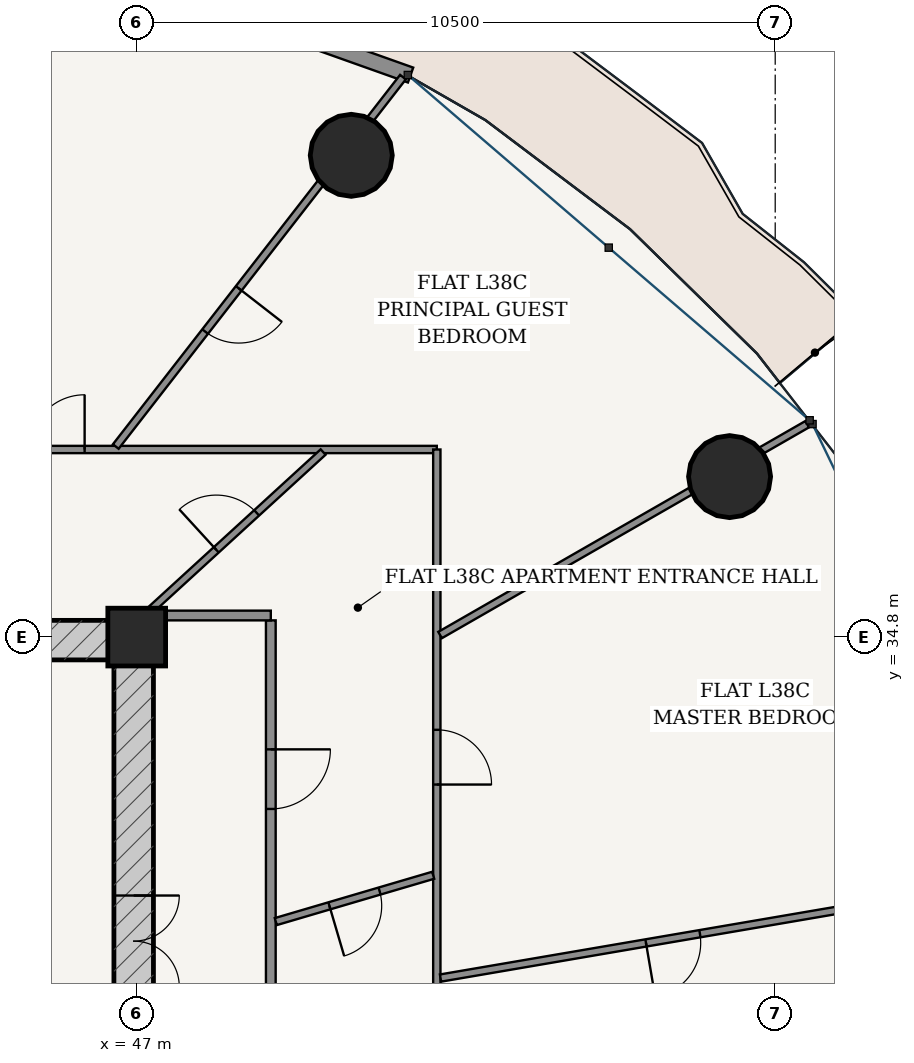
"""IFC4 building model, lengths in metres.
Left out: names, types, materials, properties, quantities, classifications, styles, units other than length and angle.
Written with IfcOpenShell. Run it as: python <this file> out.ifc"""

import sys

from ifc_helpers import new_model, si_unit, direction, frame, frame_2d, origin, origin_2d, place, context, subcontext, project, spatial, rectangle, hollow_circle, extrude, source, transform, mapped, element, fill, save


model = new_model("IFC4")
c1 = context("Model", 3, precision=1e-05, world=origin(), true_north=direction((-0.2419218956, 0.970295726276)))
c2 = subcontext(c1, "Body", "Model", "MODEL_VIEW")
j1 = project(units=[si_unit("LENGTHUNIT", "METRE"), si_unit("PLANEANGLEUNIT", "RADIAN")], contexts=[c1])
p1 = place(None, origin())
s1 = spatial("IfcSite", under=j1, at=p1, CompositionType="ELEMENT")
p2 = place(p1, origin())
s2 = spatial("IfcBuilding", under=s1, at=p2, CompositionType="ELEMENT")
p3 = place(p2, frame((0.0, 0.0, 146.2)))
s3 = spatial("IfcBuildingStorey", under=s2, at=p3, CompositionType="ELEMENT", Elevation=146.2)
p4 = place(p3, frame((47.0, 34.8, 0.0), z_axis=(0.0, 0.0, 1.0), x_axis=(1.0, 0.0, 0.0)))
e1 = element("IfcColumn", 1, at=p4, inside=s3, PredefinedType="COLUMN", context=c2, shape_type="SweptSolid", body=[
    extrude(rectangle(XDim=0.95, YDim=0.95, at=origin_2d()), origin(), (0.0, 0.0, 1.0), 3.6),
])
p5 = place(p3, frame((28.725, 34.75, 0.0), z_axis=(0.0, 0.0, 1.0), x_axis=(1.0, 0.0, 0.0)))
e2 = element("IfcWall", 2, at=p5, inside=s3, PredefinedType="SHEAR", context=c2, shape_type="SweptSolid", body=[
    extrude(rectangle(XDim=18.55, YDim=0.65, at=frame_2d((9.275, 0.0))), origin(), (0.0, 0.0, 1.0), 3.33),
])
p6 = place(p3, frame((46.95, 19.175, 0.0), z_axis=(0.0, 0.0, 1.0), x_axis=(0.0, 1.0, 0.0)))
e3 = element("IfcWall", 3, at=p6, inside=s3, PredefinedType="SHEAR", context=c2, shape_type="SweptSolid", body=[
    extrude(rectangle(XDim=15.25, YDim=0.65, at=frame_2d((7.625, 0.0))), origin(), (0.0, 0.0, 1.0), 3.33),
])
p7 = place(p6, frame((9.875, 0.0, 0.0)))
e4 = element("IfcOpeningElement", 4, at=p7, cuts=e3, PredefinedType="OPENING", context=c2, shape_type="SweptSolid", body=[
    extrude(rectangle(XDim=1.5, YDim=2.2, at=frame_2d((0.75, 1.1))), frame((0.0, 0.335, 0.0), z_axis=(0.0, -1.0, 0.0), x_axis=(1.0, 0.0, 0.0)), (0.0, 0.0, 1.0), 0.67),
])
for number, where, z_axis, x_axis in (
    (5, (56.75, 37.439, 0.0), (0.0, 0.0, 1.0), (1.0, 0.0, 0.0)),
    (6, (50.528, 42.723, 0.0), (0.0, 0.0, 1.0), (1.0, 0.0, 0.0)),
):
    element("IfcColumn", number, at=place(p3, frame(where, z_axis=z_axis, x_axis=x_axis)), inside=s3, PredefinedType="COLUMN", context=c2, shape_type="SweptSolid", body=[
        extrude(hollow_circle(Radius=0.675, WallThickness=0.042, at=origin_2d()), origin(), (0.0, 0.0, 1.0), 3.6),
    ])
p8 = place(p3, frame((51.503, 44.043, 0.0), z_axis=(0.0, 0.0, 1.0), x_axis=(-0.942095406405, 0.335344964522, 0.0)))
e7 = element("IfcWall", 7, at=p8, inside=s3, PredefinedType="SOLIDWALL", context=c2, shape_type="SweptSolid", body=[
    extrude(rectangle(XDim=9.408, YDim=0.26, at=frame_2d((4.704, 0.0))), origin(), (0.0, 0.0, 1.0), 3.33),
])
p9 = place(p8, frame((4.029, 0.0, 0.0)))
e8 = element("IfcOpeningElement", 8, at=p9, cuts=e7, PredefinedType="OPENING", context=c2, shape_type="SweptSolid", body=[
    extrude(rectangle(XDim=1.35, YDim=2.2, at=frame_2d((0.675, 1.1))), frame((0.0, 0.14, 0.0), z_axis=(0.0, -1.0, 0.0), x_axis=(1.0, 0.0, 0.0)), (0.0, 0.0, 1.0), 0.28),
])
p10 = place(p3, frame((49.205, 16.675, 0.0), z_axis=(0.0, 0.0, 1.0), x_axis=(0.0, 1.0, 0.0)))
e9 = element("IfcWall", 9, at=p10, inside=s3, PredefinedType="PARTITIONING", context=c2, shape_type="SweptSolid", body=[
    extrude(rectangle(XDim=18.4, YDim=0.16, at=frame_2d((9.2, 0.0))), origin(), (0.0, 0.0, 1.0), 2.776),
])
p11 = place(p10, frame((15.299, 0.0, 0.0)))
e10 = element("IfcOpeningElement", 10, at=p11, cuts=e9, PredefinedType="OPENING", context=c2, shape_type="SweptSolid", body=[
    extrude(rectangle(XDim=0.98, YDim=2.2, at=frame_2d((0.49, 1.1))), frame((0.0, 0.09, 0.0), z_axis=(0.0, -1.0, 0.0), x_axis=(1.0, 0.0, 0.0)), (0.0, 0.0, 1.0), 0.18),
])
p12 = place(p3, frame((47.275, 35.155, 0.0), z_axis=(0.0, 0.0, 1.0), x_axis=(1.0, 0.0, 0.0)))
e11 = element("IfcWall", 11, at=p12, inside=s3, PredefinedType="PARTITIONING", context=c2, shape_type="SweptSolid", body=[
    extrude(rectangle(XDim=1.93, YDim=0.16, at=frame_2d((0.965, 0.0))), origin(), (0.0, 0.0, 1.0), 2.776),
])
p13 = place(p3, frame((44.465, 37.885, 0.0), z_axis=(0.0, 0.0, 1.0), x_axis=(1.0, 0.0, 0.0)))
e12 = element("IfcWall", 12, at=p13, inside=s3, PredefinedType="PARTITIONING", context=c2, shape_type="SweptSolid", body=[
    extrude(rectangle(XDim=7.47, YDim=0.12, at=frame_2d((3.735, 0.0))), origin(), (0.0, 0.0, 1.0), 2.776),
])
p14 = place(p13, frame((0.778, 0.0, 0.0)))
e13 = element("IfcOpeningElement", 13, at=p14, cuts=e12, PredefinedType="OPENING", context=c2, shape_type="SweptSolid", body=[
    extrude(rectangle(XDim=0.9, YDim=2.15, at=frame_2d((0.45, 1.075))), frame((0.0, 0.07, 0.0), z_axis=(0.0, -1.0, 0.0), x_axis=(1.0, 0.0, 0.0)), (0.0, 0.0, 1.0), 0.14),
])
p15 = place(p3, frame((51.935, 37.885, 0.0), z_axis=(0.0, 0.0, 1.0), x_axis=(0.0, -1.0, 0.0)))
e14 = element("IfcWall", 14, at=p15, inside=s3, PredefinedType="PARTITIONING", context=c2, shape_type="SweptSolid", body=[
    extrude(rectangle(XDim=22.96, YDim=0.12, at=frame_2d((11.48, 0.0))), origin(), (0.0, 0.0, 1.0), 2.776),
])
p16 = place(p15, frame((4.61, 0.0, 0.0)))
e15 = element("IfcOpeningElement", 15, at=p16, cuts=e14, PredefinedType="OPENING", context=c2, shape_type="SweptSolid", body=[
    extrude(rectangle(XDim=0.9, YDim=2.15, at=frame_2d((0.45, 1.075))), frame((0.0, 0.07, 0.0), z_axis=(0.0, -1.0, 0.0), x_axis=(1.0, 0.0, 0.0)), (0.0, 0.0, 1.0), 0.14),
])
p17 = place(p15, frame((19.31, 0.0, 0.0)))
e16 = element("IfcOpeningElement", 16, at=p17, cuts=e14, PredefinedType="OPENING", context=c2, shape_type="SweptSolid", body=[
    extrude(rectangle(XDim=0.86, YDim=2.15, at=frame_2d((0.43, 1.075))), frame((0.0, 0.07, 0.0), z_axis=(0.0, -1.0, 0.0), x_axis=(1.0, 0.0, 0.0)), (0.0, 0.0, 1.0), 0.14),
])
p18 = place(p15, frame((13.341, 0.0, 0.0)))
e17 = element("IfcOpeningElement", 17, at=p18, cuts=e14, PredefinedType="OPENING", context=c2, shape_type="SweptSolid", body=[
    extrude(rectangle(XDim=0.9, YDim=2.15, at=frame_2d((0.45, 1.075))), frame((0.0, 0.07, 0.0), z_axis=(0.0, -1.0, 0.0), x_axis=(1.0, 0.0, 0.0)), (0.0, 0.0, 1.0), 0.14),
])
p19 = place(p3, frame((51.996, 29.193, 0.0), z_axis=(0.0, 0.0, 1.0), x_axis=(0.985698378271, 0.168519159369, 0.0)))
e18 = element("IfcWall", 18, at=p19, inside=s3, PredefinedType="PARTITIONING", context=c2, shape_type="SweptSolid", body=[
    extrude(rectangle(XDim=9.769, YDim=0.12, at=frame_2d((4.884, 0.0))), origin(), (0.0, 0.0, 1.0), 2.776),
])
p20 = place(p19, frame((3.428, 0.0, 0.0)))
e19 = element("IfcOpeningElement", 19, at=p20, cuts=e18, PredefinedType="OPENING", context=c2, shape_type="SweptSolid", body=[
    extrude(rectangle(XDim=0.9, YDim=2.15, at=frame_2d((0.45, 1.075))), frame((0.0, 0.07, 0.0), z_axis=(0.0, -1.0, 0.0), x_axis=(1.0, 0.0, 0.0)), (0.0, 0.0, 1.0), 0.14),
])
p21 = place(p3, frame((51.989, 34.834, 0.0), z_axis=(0.0, 0.0, 1.0), x_axis=(0.86717064002, 0.498011125466, 0.0)))
e20 = element("IfcWall", 20, at=p21, inside=s3, PredefinedType="PARTITIONING", context=c2, shape_type="SweptSolid", body=[
    extrude(rectangle(XDim=6.961, YDim=0.12, at=frame_2d((3.48, 0.0))), origin(), (0.0, 0.0, 1.0), 2.776),
])
p22 = place(p3, frame((46.656, 37.934, 0.0), z_axis=(0.0, 0.0, 1.0), x_axis=(0.613758289074, 0.789493991487, 0.0)))
e21 = element("IfcWall", 21, at=p22, inside=s3, PredefinedType="PARTITIONING", context=c2, shape_type="SweptSolid", body=[
    extrude(rectangle(XDim=7.695, YDim=0.12, at=frame_2d((3.848, 0.0))), origin(), (0.0, 0.0, 1.0), 2.776),
])
p23 = place(p22, frame((2.395, 0.0, 0.0)))
e22 = element("IfcOpeningElement", 22, at=p23, cuts=e21, PredefinedType="OPENING", context=c2, shape_type="SweptSolid", body=[
    extrude(rectangle(XDim=0.9, YDim=2.15, at=frame_2d((0.45, 1.075))), frame((0.0, 0.07, 0.0), z_axis=(0.0, -1.0, 0.0), x_axis=(1.0, 0.0, 0.0)), (0.0, 0.0, 1.0), 0.14),
])
p24 = place(p3, frame((49.287, 30.121, 0.0), z_axis=(0.0, 0.0, 1.0), x_axis=(0.959304970846, 0.282372046969, 0.0)))
e23 = element("IfcWall", 23, at=p24, inside=s3, PredefinedType="PARTITIONING", context=c2, shape_type="SweptSolid", body=[
    extrude(rectangle(XDim=2.698, YDim=0.12, at=frame_2d((1.349, 0.0))), origin(), (0.0, 0.0, 1.0), 3.33),
])
p25 = place(p24, frame((0.919, 0.0, 0.0)))
e24 = element("IfcOpeningElement", 24, at=p25, cuts=e23, PredefinedType="OPENING", context=c2, shape_type="SweptSolid", body=[
    extrude(rectangle(XDim=0.86, YDim=2.15, at=frame_2d((0.43, 1.075))), frame((0.0, 0.07, 0.0), z_axis=(0.0, -1.0, 0.0), x_axis=(1.0, 0.0, 0.0)), (0.0, 0.0, 1.0), 0.14),
])
p26 = place(p3, frame((47.216, 35.235, 0.0), z_axis=(0.0, 0.0, 1.0), x_axis=(0.73766811085, 0.675163504816, 0.0)))
e25 = element("IfcWall", 25, at=p26, inside=s3, PredefinedType="PARTITIONING", context=c2, shape_type="SweptSolid", body=[
    extrude(rectangle(XDim=3.863, YDim=0.12, at=frame_2d((1.932, 0.0))), origin(), (0.0, 0.0, 1.0), 2.776),
])
p27 = place(p26, frame((1.481, 0.0, 0.0)))
e26 = element("IfcOpeningElement", 26, at=p27, cuts=e25, PredefinedType="OPENING", context=c2, shape_type="SweptSolid", body=[
    extrude(rectangle(XDim=0.9, YDim=2.15, at=frame_2d((0.45, 1.075))), frame((0.0, 0.07, 0.0), z_axis=(0.0, -1.0, 0.0), x_axis=(1.0, 0.0, 0.0)), (0.0, 0.0, 1.0), 0.14),
])
m1 = source(origin(), c2, "Body", "SweptSolid", [
    extrude(rectangle(XDim=1.5, YDim=2.2, at=frame_2d((0.75, 1.1))), frame((0.0, 0.025, 0.0), z_axis=(0.0, -1.0, 0.0), x_axis=(1.0, 0.0, 0.0)), (0.0, 0.0, 1.0), 0.05),
])
p28 = place(p7, frame((1.5, 0.0, 0.0), z_axis=(0.0, 0.0, 1.0), x_axis=(-1.0, 0.0, 0.0)))
e27 = element("IfcDoor", 27, at=p28, inside=s3, OperationType="DOUBLE_DOOR_SINGLE_SWING", PredefinedType="DOOR", context=c2, shape_type="MappedRepresentation", body=[
    mapped(m1, transform((0.0, 0.0, 0.0), scale=1.0)),
])
fill(e4, e27)
m2 = source(origin(), c2, "Body", "SweptSolid", [
    extrude(rectangle(XDim=0.98, YDim=2.2, at=frame_2d((0.49, 1.1))), frame((0.0, 0.025, 0.0), z_axis=(0.0, -1.0, 0.0), x_axis=(1.0, 0.0, 0.0)), (0.0, 0.0, 1.0), 0.05),
])
p29 = place(p11, frame((0.98, 0.0, 0.0), z_axis=(0.0, 0.0, 1.0), x_axis=(-1.0, 0.0, 0.0)))
e28 = element("IfcDoor", 28, at=p29, inside=s3, OperationType="SINGLE_SWING_LEFT", PredefinedType="DOOR", context=c2, shape_type="MappedRepresentation", body=[
    mapped(m2, transform((0.0, 0.0, 0.0), scale=1.0)),
])
fill(e10, e28)
m3 = source(origin(), c2, "Body", "SweptSolid", [
    extrude(rectangle(XDim=0.86, YDim=2.15, at=frame_2d((0.43, 1.075))), frame((0.0, 0.025, 0.0), z_axis=(0.0, -1.0, 0.0), x_axis=(1.0, 0.0, 0.0)), (0.0, 0.0, 1.0), 0.05),
])
p30 = place(p25, frame((0.86, 0.0, 0.0), z_axis=(0.0, 0.0, 1.0), x_axis=(-1.0, 0.0, 0.0)))
e29 = element("IfcDoor", 29, at=p30, inside=s3, OperationType="SINGLE_SWING_RIGHT", PredefinedType="DOOR", context=c2, shape_type="MappedRepresentation", body=[
    mapped(m3, transform((0.0, 0.0, 0.0), scale=1.0)),
])
fill(e24, e29)
m4 = source(origin(), c2, "Body", "SweptSolid", [
    extrude(rectangle(XDim=0.9, YDim=2.15, at=frame_2d((0.45, 1.075))), frame((0.0, 0.025, 0.0), z_axis=(0.0, -1.0, 0.0), x_axis=(1.0, 0.0, 0.0)), (0.0, 0.0, 1.0), 0.05),
])
p31 = place(p27, origin())
e30 = element("IfcDoor", 30, at=p31, inside=s3, OperationType="SINGLE_SWING_LEFT", PredefinedType="DOOR", context=c2, shape_type="MappedRepresentation", body=[
    mapped(m4, transform((0.0, 0.0, 0.0), scale=1.0)),
])
fill(e26, e30)
p32 = place(p14, origin())
e31 = element("IfcDoor", 31, at=p32, inside=s3, OperationType="SINGLE_SWING_RIGHT", PredefinedType="DOOR", context=c2, shape_type="MappedRepresentation", body=[
    mapped(m4, transform((0.0, 0.0, 0.0), scale=1.0)),
])
fill(e13, e31)
p33 = place(p16, origin())
e32 = element("IfcDoor", 32, at=p33, inside=s3, OperationType="SINGLE_SWING_RIGHT", PredefinedType="DOOR", context=c2, shape_type="MappedRepresentation", body=[
    mapped(m4, transform((0.0, 0.0, 0.0), scale=1.0)),
])
fill(e15, e32)
p34 = place(p23, frame((0.9, 0.0, 0.0), z_axis=(0.0, 0.0, 1.0), x_axis=(-1.0, 0.0, 0.0)))
e33 = element("IfcDoor", 33, at=p34, inside=s3, OperationType="SINGLE_SWING_LEFT", PredefinedType="DOOR", context=c2, shape_type="MappedRepresentation", body=[
    mapped(m4, transform((0.0, 0.0, 0.0), scale=1.0)),
])
fill(e22, e33)
p35 = place(p20, frame((0.9, 0.0, 0.0), z_axis=(0.0, 0.0, 1.0), x_axis=(-1.0, 0.0, 0.0)))
e34 = element("IfcDoor", 34, at=p35, inside=s3, OperationType="SINGLE_SWING_RIGHT", PredefinedType="DOOR", context=c2, shape_type="MappedRepresentation", body=[
    mapped(m4, transform((0.0, 0.0, 0.0), scale=1.0)),
])
fill(e19, e34)
save(model, sys.argv[1])
